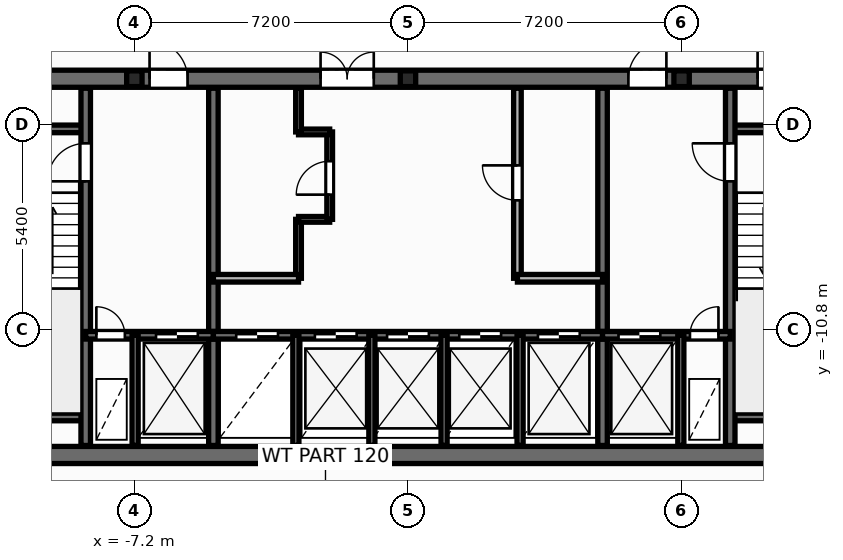
"""IFC4 building model, lengths in metres.
Left out: names, types, materials, properties, quantities, classifications, styles, units other than length and angle.
Written with IfcOpenShell. Run it as: python <this file> out.ifc"""

import sys

from ifc_helpers import new_model, si_unit, direction, frame, frame_2d, origin, origin_2d, place, context, subcontext, project, spatial, rectangle, i_section, extrude, element, fill, save


model = new_model("IFC4")
c1 = context("Model", 3, precision=1e-05, world=origin(), true_north=direction((0.0, 1.0)))
c2 = subcontext(c1, "Body", "Model", "MODEL_VIEW")
j1 = project(units=[si_unit("LENGTHUNIT", "METRE"), si_unit("PLANEANGLEUNIT", "RADIAN")], contexts=[c1])
p1 = place(None, origin())
s1 = spatial("IfcSite", under=j1, at=p1, CompositionType="ELEMENT")
p2 = place(p1, origin())
s2 = spatial("IfcBuilding", under=s1, at=p2, CompositionType="ELEMENT")
p3 = place(p2, frame((0.0, 0.0, 189.3)))
s3 = spatial("IfcBuildingStorey", under=s2, at=p3, CompositionType="ELEMENT", Elevation=189.3)
for number, where, z_axis, x_axis in (
    (1, (-7.2, -4.2, 0.0), (0.0, 0.0, 1.0), (1.0, 0.0, 0.0)),
    (2, (0.0, -4.2, 0.0), (0.0, 0.0, 1.0), (1.0, 0.0, 0.0)),
    (3, (7.2, -4.2, 0.0), (0.0, 0.0, 1.0), (1.0, 0.0, 0.0)),
):
    element("IfcColumn", number, at=place(p3, frame(where, z_axis=z_axis, x_axis=x_axis)), inside=s3, PredefinedType="PILASTER", context=c2, shape_type="SweptSolid", body=[
        extrude(i_section(OverallWidth=0.405, OverallDepth=0.414, WebThickness=0.022, FlangeThickness=0.032, at=origin_2d()), origin(), (0.0, 0.0, 1.0), 3.6),
    ])
p4 = place(p3, frame((-2.88, -9.45, 0.0), z_axis=(0.0, 0.0, 1.0), x_axis=(0.0, 1.0, 0.0)))
e4 = element("IfcWall", 4, at=p4, inside=s3, PredefinedType="PARTITIONING", context=c2, shape_type="SweptSolid", body=[
    extrude(rectangle(XDim=1.55, YDim=0.15, at=frame_2d((0.775, 0.0))), origin(), (0.0, 0.0, 1.0), 3.35),
])
p5 = place(p3, frame((-2.88, -7.9, 0.0), z_axis=(0.0, 0.0, 1.0), x_axis=(1.0, 0.0, 0.0)))
e5 = element("IfcWall", 5, at=p5, inside=s3, PredefinedType="PARTITIONING", context=c2, shape_type="SweptSolid", body=[
    extrude(rectangle(XDim=0.82, YDim=0.15, at=frame_2d((0.41, 0.0))), origin(), (0.0, 0.0, 1.0), 3.35),
])
p6 = place(p3, frame((-2.06, -7.9, 0.0), z_axis=(0.0, 0.0, 1.0), x_axis=(0.0, 1.0, 0.0)))
e6 = element("IfcWall", 6, at=p6, inside=s3, PredefinedType="PARTITIONING", context=c2, shape_type="SweptSolid", body=[
    extrude(rectangle(XDim=2.3, YDim=0.15, at=frame_2d((1.15, 0.0))), origin(), (0.0, 0.0, 1.0), 3.35),
])
p7 = place(p6, frame((0.65, 0.0, 0.0)))
e7 = element("IfcOpeningElement", 7, at=p7, cuts=e6, PredefinedType="OPENING", context=c2, shape_type="SweptSolid", body=[
    extrude(rectangle(XDim=0.886, YDim=2.104, at=frame_2d((0.44, 1.052))), frame((0.0, 0.085, 0.0), z_axis=(0.0, -1.0, 0.0), x_axis=(1.0, 0.0, 0.0)), (0.0, 0.0, 1.0), 0.17),
])
p8 = place(p3, frame((-2.88, -5.6, 0.0), z_axis=(0.0, 0.0, 1.0), x_axis=(1.0, 0.0, 0.0)))
e8 = element("IfcWall", 8, at=p8, inside=s3, PredefinedType="PARTITIONING", context=c2, shape_type="SweptSolid", body=[
    extrude(rectangle(XDim=0.82, YDim=0.15, at=frame_2d((0.41, 0.0))), origin(), (0.0, 0.0, 1.0), 3.35),
])
p9 = place(p3, frame((-2.88, -5.6, 0.0), z_axis=(0.0, 0.0, 1.0), x_axis=(0.0, 1.0, 0.0)))
e9 = element("IfcWall", 9, at=p9, inside=s3, PredefinedType="PARTITIONING", context=c2, shape_type="SweptSolid", body=[
    extrude(rectangle(XDim=1.15, YDim=0.15, at=frame_2d((0.575, 0.0))), origin(), (0.0, 0.0, 1.0), 3.35),
])
p10 = place(p3, frame((-12.65, -14.1, 0.0), z_axis=(0.0, 0.0, 1.0), x_axis=(1.0, 0.0, 0.0)))
e10 = element("IfcWall", 10, at=p10, inside=s3, PredefinedType="SHEAR", context=c2, shape_type="SweptSolid", body=[
    extrude(rectangle(XDim=25.3, YDim=0.45, at=frame_2d((12.65, 0.0))), origin(), (0.0, 0.0, 1.0), 3.6),
])
p11 = place(p3, frame((-12.65, -4.2, 0.0), z_axis=(0.0, 0.0, 1.0), x_axis=(1.0, 0.0, 0.0)))
e11 = element("IfcWall", 11, at=p11, inside=s3, PredefinedType="SHEAR", context=c2, shape_type="SweptSolid", body=[
    extrude(rectangle(XDim=25.3, YDim=0.45, at=frame_2d((12.65, 0.0))), origin(), (0.0, 0.0, 1.0), 3.6),
])
p12 = place(p11, frame((1.85, 0.0, 0.0)))
e12 = element("IfcOpeningElement", 12, at=p12, cuts=e11, PredefinedType="OPENING", context=c2, shape_type="SweptSolid", body=[
    extrude(rectangle(XDim=0.756, YDim=2.054, at=frame_2d((0.375, 1.027))), frame((0.0, 0.235, 0.0), z_axis=(0.0, -1.0, 0.0), x_axis=(1.0, 0.0, 0.0)), (0.0, 0.0, 1.0), 0.47),
])
p13 = place(p11, frame((21.85, 0.0, 0.0)))
e13 = element("IfcOpeningElement", 13, at=p13, cuts=e11, PredefinedType="OPENING", context=c2, shape_type="SweptSolid", body=[
    extrude(rectangle(XDim=0.756, YDim=2.054, at=frame_2d((0.375, 1.027))), frame((0.0, 0.235, 0.0), z_axis=(0.0, -1.0, 0.0), x_axis=(1.0, 0.0, 0.0)), (0.0, 0.0, 1.0), 0.47),
])
p14 = place(p11, frame((23.5, 0.0, 0.0)))
e14 = element("IfcOpeningElement", 14, at=p14, cuts=e11, PredefinedType="OPENING", context=c2, shape_type="SweptSolid", body=[
    extrude(rectangle(XDim=0.756, YDim=2.054, at=frame_2d((0.375, 1.027))), frame((0.0, 0.235, 0.0), z_axis=(0.0, -1.0, 0.0), x_axis=(1.0, 0.0, 0.0)), (0.0, 0.0, 1.0), 0.47),
])
p15 = place(p11, frame((5.85, 0.0, 0.0)))
e15 = element("IfcOpeningElement", 15, at=p15, cuts=e11, PredefinedType="OPENING", context=c2, shape_type="SweptSolid", body=[
    extrude(rectangle(XDim=1.006, YDim=2.104, at=frame_2d((0.5, 1.052))), frame((0.0, 0.235, 0.0), z_axis=(0.0, -1.0, 0.0), x_axis=(1.0, 0.0, 0.0)), (0.0, 0.0, 1.0), 0.47),
])
p16 = place(p11, frame((10.35, 0.0, 0.0)))
e16 = element("IfcOpeningElement", 16, at=p16, cuts=e11, PredefinedType="OPENING", context=c2, shape_type="SweptSolid", body=[
    extrude(rectangle(XDim=1.406, YDim=2.154, at=frame_2d((0.7, 1.077))), frame((0.0, 0.235, 0.0), z_axis=(0.0, -1.0, 0.0), x_axis=(1.0, 0.0, 0.0)), (0.0, 0.0, 1.0), 0.47),
])
p17 = place(p11, frame((18.45, 0.0, 0.0)))
e17 = element("IfcOpeningElement", 17, at=p17, cuts=e11, PredefinedType="OPENING", context=c2, shape_type="SweptSolid", body=[
    extrude(rectangle(XDim=1.006, YDim=2.104, at=frame_2d((0.5, 1.052))), frame((0.0, 0.235, 0.0), z_axis=(0.0, -1.0, 0.0), x_axis=(1.0, 0.0, 0.0)), (0.0, 0.0, 1.0), 0.47),
])
for number, where, z_axis, x_axis in (
    (18, (-12.35, -5.52, 0.0), (0.0, 0.0, 1.0), (1.0, 0.0, 0.0)),
    (19, (-12.35, -13.1, 0.0), (0.0, 0.0, 1.0), (1.0, 0.0, 0.0)),
    (20, (8.48, -5.52, 0.0), (0.0, 0.0, 1.0), (1.0, 0.0, 0.0)),
    (21, (8.48, -13.1, 0.0), (0.0, 0.0, 1.0), (1.0, 0.0, 0.0)),
):
    element("IfcWall", number, at=place(p3, frame(where, z_axis=z_axis, x_axis=x_axis)), inside=s3, PredefinedType="SOLIDWALL", context=c2, shape_type="SweptSolid", body=[
        extrude(rectangle(XDim=3.87, YDim=0.2, at=frame_2d((1.935, 0.0))), origin(), (0.0, 0.0, 1.0), 3.6),
    ])
p18 = place(p3, frame((-8.48, -13.85, 0.0), z_axis=(0.0, 0.0, 1.0), x_axis=(0.0, 1.0, 0.0)))
e22 = element("IfcWall", 22, at=p18, inside=s3, PredefinedType="SHEAR", context=c2, shape_type="SweptSolid", body=[
    extrude(rectangle(XDim=9.4, YDim=0.25, at=frame_2d((4.7, 0.0))), origin(), (0.0, 0.0, 1.0), 3.6),
])
p19 = place(p18, frame((6.95, 0.0, 0.0)))
e23 = element("IfcOpeningElement", 23, at=p19, cuts=e22, PredefinedType="OPENING", context=c2, shape_type="SweptSolid", body=[
    extrude(rectangle(XDim=1.006, YDim=2.104, at=frame_2d((0.5, 1.052))), frame((0.0, 0.135, 0.0), z_axis=(0.0, -1.0, 0.0), x_axis=(1.0, 0.0, 0.0)), (0.0, 0.0, 1.0), 0.27),
])
p20 = place(p3, frame((8.48, -13.85, 0.0), z_axis=(0.0, 0.0, 1.0), x_axis=(0.0, 1.0, 0.0)))
e24 = element("IfcWall", 24, at=p20, inside=s3, PredefinedType="SHEAR", context=c2, shape_type="SweptSolid", body=[
    extrude(rectangle(XDim=9.4, YDim=0.25, at=frame_2d((4.7, 0.0))), origin(), (0.0, 0.0, 1.0), 3.6),
])
p21 = place(p20, frame((6.95, 0.0, 0.0)))
e25 = element("IfcOpeningElement", 25, at=p21, cuts=e24, PredefinedType="OPENING", context=c2, shape_type="SweptSolid", body=[
    extrude(rectangle(XDim=1.006, YDim=2.104, at=frame_2d((0.5, 1.052))), frame((0.0, 0.135, 0.0), z_axis=(0.0, -1.0, 0.0), x_axis=(1.0, 0.0, 0.0)), (0.0, 0.0, 1.0), 0.27),
])
for number, where, z_axis, x_axis in (
    (26, (-5.12, -13.85, 0.0), (0.0, 0.0, 1.0), (0.0, 1.0, 0.0)),
    (27, (5.12, -13.85, 0.0), (0.0, 0.0, 1.0), (0.0, 1.0, 0.0)),
):
    element("IfcWall", number, at=place(p3, frame(where, z_axis=z_axis, x_axis=x_axis)), inside=s3, PredefinedType="SHEAR", context=c2, shape_type="SweptSolid", body=[
        extrude(rectangle(XDim=9.4, YDim=0.25, at=frame_2d((4.7, 0.0))), origin(), (0.0, 0.0, 1.0), 3.6),
    ])
p22 = place(p3, frame((-8.48, -10.95, 0.0), z_axis=(0.0, 0.0, 1.0), x_axis=(1.0, 0.0, 0.0)))
e28 = element("IfcWall", 28, at=p22, inside=s3, PredefinedType="SOLIDWALL", context=c2, shape_type="SweptSolid", body=[
    extrude(rectangle(XDim=3.36, YDim=0.2, at=frame_2d((1.68, 0.0))), origin(), (0.0, 0.0, 1.0), 3.6),
])
p23 = place(p22, frame((0.28, 0.0, 0.0)))
e29 = element("IfcOpeningElement", 29, at=p23, cuts=e28, PredefinedType="OPENING", context=c2, shape_type="SweptSolid", body=[
    extrude(rectangle(XDim=0.756, YDim=2.054, at=frame_2d((0.375, 1.027))), frame((0.0, 0.11, 0.0), z_axis=(0.0, -1.0, 0.0), x_axis=(1.0, 0.0, 0.0)), (0.0, 0.0, 1.0), 0.22),
])
p24 = place(p22, frame((1.85, 0.0, 0.0)))
e30 = element("IfcOpeningElement", 30, at=p24, cuts=e28, PredefinedType="OPENING", context=c2, shape_type="SweptSolid", body=[
    extrude(rectangle(XDim=1.106, YDim=2.104, at=frame_2d((0.55, 1.052))), frame((0.0, 0.11, 0.0), z_axis=(0.0, -1.0, 0.0), x_axis=(1.0, 0.0, 0.0)), (0.0, 0.0, 1.0), 0.22),
])
p25 = place(p3, frame((-5.12, -10.95, 0.0), z_axis=(0.0, 0.0, 1.0), x_axis=(1.0, 0.0, 0.0)))
e31 = element("IfcWall", 31, at=p25, inside=s3, PredefinedType="SOLIDWALL", context=c2, shape_type="SweptSolid", body=[
    extrude(rectangle(XDim=10.24, YDim=0.2, at=frame_2d((5.12, 0.0))), origin(), (0.0, 0.0, 1.0), 3.6),
])
p26 = place(p25, frame((0.6, 0.0, 0.0)))
e32 = element("IfcOpeningElement", 32, at=p26, cuts=e31, PredefinedType="OPENING", context=c2, shape_type="SweptSolid", body=[
    extrude(rectangle(XDim=1.106, YDim=2.104, at=frame_2d((0.55, 1.052))), frame((0.0, 0.11, 0.0), z_axis=(0.0, -1.0, 0.0), x_axis=(1.0, 0.0, 0.0)), (0.0, 0.0, 1.0), 0.22),
])
p27 = place(p25, frame((2.67, 0.0, 0.0)))
e33 = element("IfcOpeningElement", 33, at=p27, cuts=e31, PredefinedType="OPENING", context=c2, shape_type="SweptSolid", body=[
    extrude(rectangle(XDim=1.106, YDim=2.104, at=frame_2d((0.55, 1.052))), frame((0.0, 0.11, 0.0), z_axis=(0.0, -1.0, 0.0), x_axis=(1.0, 0.0, 0.0)), (0.0, 0.0, 1.0), 0.22),
])
p28 = place(p25, frame((4.57, 0.0, 0.0)))
e34 = element("IfcOpeningElement", 34, at=p28, cuts=e31, PredefinedType="OPENING", context=c2, shape_type="SweptSolid", body=[
    extrude(rectangle(XDim=1.106, YDim=2.104, at=frame_2d((0.55, 1.052))), frame((0.0, 0.11, 0.0), z_axis=(0.0, -1.0, 0.0), x_axis=(1.0, 0.0, 0.0)), (0.0, 0.0, 1.0), 0.22),
])
p29 = place(p25, frame((6.47, 0.0, 0.0)))
e35 = element("IfcOpeningElement", 35, at=p29, cuts=e31, PredefinedType="OPENING", context=c2, shape_type="SweptSolid", body=[
    extrude(rectangle(XDim=1.106, YDim=2.104, at=frame_2d((0.55, 1.052))), frame((0.0, 0.11, 0.0), z_axis=(0.0, -1.0, 0.0), x_axis=(1.0, 0.0, 0.0)), (0.0, 0.0, 1.0), 0.22),
])
p30 = place(p25, frame((8.54, 0.0, 0.0)))
e36 = element("IfcOpeningElement", 36, at=p30, cuts=e31, PredefinedType="OPENING", context=c2, shape_type="SweptSolid", body=[
    extrude(rectangle(XDim=1.106, YDim=2.104, at=frame_2d((0.55, 1.052))), frame((0.0, 0.11, 0.0), z_axis=(0.0, -1.0, 0.0), x_axis=(1.0, 0.0, 0.0)), (0.0, 0.0, 1.0), 0.22),
])
p31 = place(p3, frame((5.12, -10.95, 0.0), z_axis=(0.0, 0.0, 1.0), x_axis=(1.0, 0.0, 0.0)))
e37 = element("IfcWall", 37, at=p31, inside=s3, PredefinedType="SOLIDWALL", context=c2, shape_type="SweptSolid", body=[
    extrude(rectangle(XDim=3.36, YDim=0.2, at=frame_2d((1.68, 0.0))), origin(), (0.0, 0.0, 1.0), 3.6),
])
p32 = place(p31, frame((0.42, 0.0, 0.0)))
e38 = element("IfcOpeningElement", 38, at=p32, cuts=e37, PredefinedType="OPENING", context=c2, shape_type="SweptSolid", body=[
    extrude(rectangle(XDim=1.106, YDim=2.104, at=frame_2d((0.55, 1.052))), frame((0.0, 0.11, 0.0), z_axis=(0.0, -1.0, 0.0), x_axis=(1.0, 0.0, 0.0)), (0.0, 0.0, 1.0), 0.22),
])
p33 = place(p31, frame((2.3, 0.0, 0.0)))
e39 = element("IfcOpeningElement", 39, at=p33, cuts=e37, PredefinedType="OPENING", context=c2, shape_type="SweptSolid", body=[
    extrude(rectangle(XDim=0.756, YDim=2.054, at=frame_2d((0.375, 1.027))), frame((0.0, 0.11, 0.0), z_axis=(0.0, -1.0, 0.0), x_axis=(1.0, 0.0, 0.0)), (0.0, 0.0, 1.0), 0.22),
])
for number, where, z_axis, x_axis in (
    (40, (-7.18, -13.85, 0.0), (0.0, 0.0, 1.0), (0.0, 1.0, 0.0)),
    (41, (7.18, -13.85, 0.0), (0.0, 0.0, 1.0), (0.0, 1.0, 0.0)),
    (42, (-2.95, -13.85, 0.0), (0.0, 0.0, 1.0), (0.0, 1.0, 0.0)),
    (43, (2.95, -13.85, 0.0), (0.0, 0.0, 1.0), (0.0, 1.0, 0.0)),
):
    element("IfcWall", number, at=place(p3, frame(where, z_axis=z_axis, x_axis=x_axis)), inside=s3, PredefinedType="PARTITIONING", context=c2, shape_type="SweptSolid", body=[
        extrude(rectangle(XDim=2.9, YDim=0.16, at=frame_2d((1.45, 0.0))), origin(), (0.0, 0.0, 1.0), 2.475),
    ])
p34 = place(p3, frame((-5.12, -9.45, 0.0), z_axis=(0.0, 0.0, 1.0), x_axis=(1.0, 0.0, 0.0)))
e44 = element("IfcWall", 44, at=p34, inside=s3, PredefinedType="SOLIDWALL", context=c2, shape_type="SweptSolid", body=[
    extrude(rectangle(XDim=2.24, YDim=0.2, at=frame_2d((1.12, 0.0))), origin(), (0.0, 0.0, 1.0), 3.35),
])
p35 = place(p3, frame((2.88, -9.45, 0.0), z_axis=(0.0, 0.0, 1.0), x_axis=(0.0, 1.0, 0.0)))
e45 = element("IfcWall", 45, at=p35, inside=s3, PredefinedType="SOLIDWALL", context=c2, shape_type="SweptSolid", body=[
    extrude(rectangle(XDim=5.0, YDim=0.2, at=frame_2d((2.5, 0.0))), origin(), (0.0, 0.0, 1.0), 3.35),
])
p36 = place(p35, frame((2.05, 0.0, 0.0)))
e46 = element("IfcOpeningElement", 46, at=p36, cuts=e45, PredefinedType="OPENING", context=c2, shape_type="SweptSolid", body=[
    extrude(rectangle(XDim=0.926, YDim=2.104, at=frame_2d((0.46, 1.052))), frame((0.0, 0.11, 0.0), z_axis=(0.0, -1.0, 0.0), x_axis=(1.0, 0.0, 0.0)), (0.0, 0.0, 1.0), 0.22),
])
p37 = place(p3, frame((2.88, -9.45, 0.0), z_axis=(0.0, 0.0, 1.0), x_axis=(1.0, 0.0, 0.0)))
e47 = element("IfcWall", 47, at=p37, inside=s3, PredefinedType="SOLIDWALL", context=c2, shape_type="SweptSolid", body=[
    extrude(rectangle(XDim=2.24, YDim=0.2, at=frame_2d((1.12, 0.0))), origin(), (0.0, 0.0, 1.0), 3.35),
])
for number, where, z_axis, x_axis in (
    (48, (-0.95, -13.85, 0.0), (0.0, 0.0, 1.0), (0.0, 1.0, 0.0)),
    (49, (0.95, -13.85, 0.0), (0.0, 0.0, 1.0), (0.0, 1.0, 0.0)),
):
    element("IfcWall", number, at=place(p3, frame(where, z_axis=z_axis, x_axis=x_axis)), inside=s3, PredefinedType="PARTITIONING", context=c2, shape_type="SweptSolid", body=[
        extrude(rectangle(XDim=2.9, YDim=0.16, at=frame_2d((1.45, 0.0))), origin(), (0.0, 0.0, 1.0), 2.475),
    ])
p38 = place(p7, origin())
e50 = element("IfcDoor", 50, at=p38, inside=s3, OperationType="SINGLE_SWING_LEFT", PredefinedType="DOOR", context=c2, shape_type="SweptSolid", body=[
    extrude(rectangle(XDim=0.88, YDim=2.1, at=frame_2d((0.44, 1.05))), frame((0.0, 0.025, 0.0), z_axis=(0.0, -1.0, 0.0), x_axis=(1.0, 0.0, 0.0)), (0.0, 0.0, 1.0), 0.05),
])
fill(e7, e50)
p39 = place(p36, origin())
e51 = element("IfcDoor", 51, at=p39, inside=s3, OperationType="SINGLE_SWING_RIGHT", PredefinedType="DOOR", context=c2, shape_type="SweptSolid", body=[
    extrude(rectangle(XDim=0.92, YDim=2.1, at=frame_2d((0.46, 1.05))), frame((0.0, 0.025, 0.0), z_axis=(0.0, -1.0, 0.0), x_axis=(1.0, 0.0, 0.0)), (0.0, 0.0, 1.0), 0.05),
])
fill(e46, e51)
p40 = place(p19, origin())
e52 = element("IfcDoor", 52, at=p40, inside=s3, OperationType="SINGLE_SWING_LEFT", PredefinedType="DOOR", context=c2, shape_type="SweptSolid", body=[
    extrude(rectangle(XDim=1.0, YDim=2.1, at=frame_2d((0.5, 1.05))), frame((0.0, 0.025, 0.0), z_axis=(0.0, -1.0, 0.0), x_axis=(1.0, 0.0, 0.0)), (0.0, 0.0, 1.0), 0.05),
])
fill(e23, e52)
p41 = place(p21, origin())
e53 = element("IfcDoor", 53, at=p41, inside=s3, OperationType="SINGLE_SWING_RIGHT", PredefinedType="DOOR", context=c2, shape_type="SweptSolid", body=[
    extrude(rectangle(XDim=1.0, YDim=2.1, at=frame_2d((0.5, 1.05))), frame((0.0, 0.025, 0.0), z_axis=(0.0, -1.0, 0.0), x_axis=(1.0, 0.0, 0.0)), (0.0, 0.0, 1.0), 0.05),
])
fill(e25, e53)
p42 = place(p23, origin())
e54 = element("IfcDoor", 54, at=p42, inside=s3, OperationType="SINGLE_SWING_LEFT", PredefinedType="DOOR", context=c2, shape_type="SweptSolid", body=[
    extrude(rectangle(XDim=0.75, YDim=2.05, at=frame_2d((0.375, 1.025))), frame((0.0, 0.025, 0.0), z_axis=(0.0, -1.0, 0.0), x_axis=(1.0, 0.0, 0.0)), (0.0, 0.0, 1.0), 0.05),
])
fill(e29, e54)
p43 = place(p24, origin())
e55 = element("IfcDoor", 55, at=p43, inside=s3, OperationType="DOUBLE_DOOR_SLIDING", PredefinedType="DOOR", context=c2, shape_type="SweptSolid", body=[
    extrude(rectangle(XDim=1.1, YDim=2.1, at=frame_2d((0.55, 1.05))), frame((0.0, 0.025, 0.0), z_axis=(0.0, -1.0, 0.0), x_axis=(1.0, 0.0, 0.0)), (0.0, 0.0, 1.0), 0.05),
])
fill(e30, e55)
p44 = place(p32, origin())
e56 = element("IfcDoor", 56, at=p44, inside=s3, OperationType="DOUBLE_DOOR_SLIDING", PredefinedType="DOOR", context=c2, shape_type="SweptSolid", body=[
    extrude(rectangle(XDim=1.1, YDim=2.1, at=frame_2d((0.55, 1.05))), frame((0.0, 0.025, 0.0), z_axis=(0.0, -1.0, 0.0), x_axis=(1.0, 0.0, 0.0)), (0.0, 0.0, 1.0), 0.05),
])
fill(e38, e56)
p45 = place(p33, origin())
e57 = element("IfcDoor", 57, at=p45, inside=s3, OperationType="SINGLE_SWING_RIGHT", PredefinedType="DOOR", context=c2, shape_type="SweptSolid", body=[
    extrude(rectangle(XDim=0.75, YDim=2.05, at=frame_2d((0.375, 1.025))), frame((0.0, 0.025, 0.0), z_axis=(0.0, -1.0, 0.0), x_axis=(1.0, 0.0, 0.0)), (0.0, 0.0, 1.0), 0.05),
])
fill(e39, e57)
p46 = place(p26, origin())
e58 = element("IfcDoor", 58, at=p46, inside=s3, OperationType="DOUBLE_DOOR_SLIDING", PredefinedType="DOOR", context=c2, shape_type="SweptSolid", body=[
    extrude(rectangle(XDim=1.1, YDim=2.1, at=frame_2d((0.55, 1.05))), frame((0.0, 0.025, 0.0), z_axis=(0.0, -1.0, 0.0), x_axis=(1.0, 0.0, 0.0)), (0.0, 0.0, 1.0), 0.05),
])
fill(e32, e58)
p47 = place(p27, origin())
e59 = element("IfcDoor", 59, at=p47, inside=s3, OperationType="DOUBLE_DOOR_SLIDING", PredefinedType="DOOR", context=c2, shape_type="SweptSolid", body=[
    extrude(rectangle(XDim=1.1, YDim=2.1, at=frame_2d((0.55, 1.05))), frame((0.0, 0.025, 0.0), z_axis=(0.0, -1.0, 0.0), x_axis=(1.0, 0.0, 0.0)), (0.0, 0.0, 1.0), 0.05),
])
fill(e33, e59)
p48 = place(p28, origin())
e60 = element("IfcDoor", 60, at=p48, inside=s3, OperationType="DOUBLE_DOOR_SLIDING", PredefinedType="DOOR", context=c2, shape_type="SweptSolid", body=[
    extrude(rectangle(XDim=1.1, YDim=2.1, at=frame_2d((0.55, 1.05))), frame((0.0, 0.025, 0.0), z_axis=(0.0, -1.0, 0.0), x_axis=(1.0, 0.0, 0.0)), (0.0, 0.0, 1.0), 0.05),
])
fill(e34, e60)
p49 = place(p29, origin())
e61 = element("IfcDoor", 61, at=p49, inside=s3, OperationType="DOUBLE_DOOR_SLIDING", PredefinedType="DOOR", context=c2, shape_type="SweptSolid", body=[
    extrude(rectangle(XDim=1.1, YDim=2.1, at=frame_2d((0.55, 1.05))), frame((0.0, 0.025, 0.0), z_axis=(0.0, -1.0, 0.0), x_axis=(1.0, 0.0, 0.0)), (0.0, 0.0, 1.0), 0.05),
])
fill(e35, e61)
p50 = place(p30, origin())
e62 = element("IfcDoor", 62, at=p50, inside=s3, OperationType="DOUBLE_DOOR_SLIDING", PredefinedType="DOOR", context=c2, shape_type="SweptSolid", body=[
    extrude(rectangle(XDim=1.1, YDim=2.1, at=frame_2d((0.55, 1.05))), frame((0.0, 0.025, 0.0), z_axis=(0.0, -1.0, 0.0), x_axis=(1.0, 0.0, 0.0)), (0.0, 0.0, 1.0), 0.05),
])
fill(e36, e62)
p51 = place(p13, origin())
e63 = element("IfcDoor", 63, at=p51, inside=s3, OperationType="SINGLE_SWING_LEFT", PredefinedType="DOOR", context=c2, shape_type="SweptSolid", body=[
    extrude(rectangle(XDim=0.75, YDim=2.05, at=frame_2d((0.375, 1.025))), frame((0.0, 0.025, 0.0), z_axis=(0.0, -1.0, 0.0), x_axis=(1.0, 0.0, 0.0)), (0.0, 0.0, 1.0), 0.05),
])
fill(e13, e63)
p52 = place(p15, origin())
e64 = element("IfcDoor", 64, at=p52, inside=s3, OperationType="SINGLE_SWING_LEFT", PredefinedType="DOOR", context=c2, shape_type="SweptSolid", body=[
    extrude(rectangle(XDim=1.0, YDim=2.1, at=frame_2d((0.5, 1.05))), frame((0.0, 0.025, 0.0), z_axis=(0.0, -1.0, 0.0), x_axis=(1.0, 0.0, 0.0)), (0.0, 0.0, 1.0), 0.05),
])
fill(e15, e64)
p53 = place(p16, origin())
e65 = element("IfcDoor", 65, at=p53, inside=s3, OperationType="DOUBLE_DOOR_SINGLE_SWING", PredefinedType="DOOR", context=c2, shape_type="SweptSolid", body=[
    extrude(rectangle(XDim=1.4, YDim=2.15, at=frame_2d((0.7, 1.075))), frame((0.0, 0.025, 0.0), z_axis=(0.0, -1.0, 0.0), x_axis=(1.0, 0.0, 0.0)), (0.0, 0.0, 1.0), 0.05),
])
fill(e16, e65)
p54 = place(p17, origin())
e66 = element("IfcDoor", 66, at=p54, inside=s3, OperationType="SINGLE_SWING_RIGHT", PredefinedType="DOOR", context=c2, shape_type="SweptSolid", body=[
    extrude(rectangle(XDim=1.0, YDim=2.1, at=frame_2d((0.5, 1.05))), frame((0.0, 0.025, 0.0), z_axis=(0.0, -1.0, 0.0), x_axis=(1.0, 0.0, 0.0)), (0.0, 0.0, 1.0), 0.05),
])
fill(e17, e66)
save(model, sys.argv[1])
